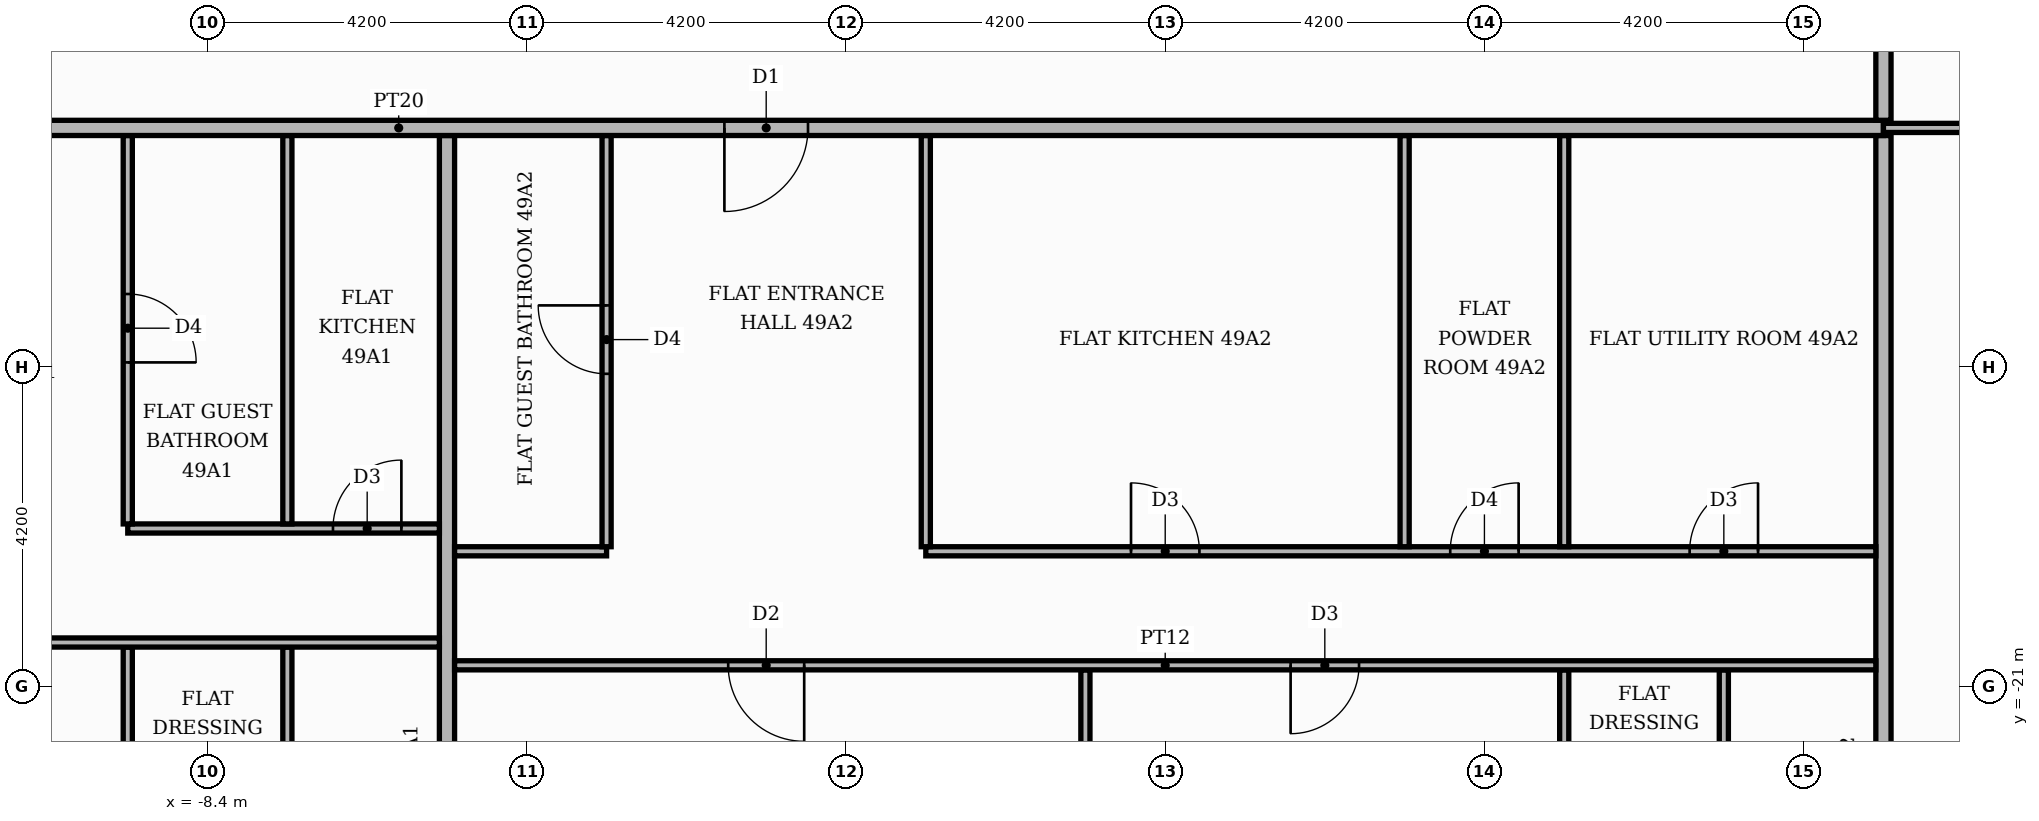
"""IFC4 building model, lengths in metres.
Left out: names, types, materials, properties, quantities, classifications, styles, units other than length and angle.
Written with IfcOpenShell. Run it as: python <this file> out.ifc"""

import sys

from ifc_helpers import new_model, si_unit, direction, frame, frame_2d, origin, place, context, subcontext, project, spatial, rectangle, extrude, element, fill, save


model = new_model("IFC4")
c1 = context("Model", 3, precision=1e-05, world=origin(), true_north=direction((0.0, 1.0)))
c2 = subcontext(c1, "Body", "Model", "MODEL_VIEW")
j1 = project(units=[si_unit("LENGTHUNIT", "METRE"), si_unit("PLANEANGLEUNIT", "RADIAN")], contexts=[c1])
p1 = place(None, origin())
s1 = spatial("IfcSite", under=j1, at=p1, CompositionType="ELEMENT")
p2 = place(p1, origin())
s2 = spatial("IfcBuilding", under=s1, at=p2, CompositionType="ELEMENT")
p3 = place(p2, frame((0.0, 0.0, 207.9)))
s3 = spatial("IfcBuildingStorey", under=s2, at=p3, CompositionType="ELEMENT", Elevation=207.9)
p4 = place(p3, frame((-9.45, -25.42, 0.0), z_axis=(0.0, 0.0, 1.0), x_axis=(0.0, 1.0, 0.0)))
e1 = element("IfcWall", 1, at=p4, inside=s3, PredefinedType="PARTITIONING", context=c2, shape_type="SweptSolid", body=[
    extrude(rectangle(XDim=4.94, YDim=0.12, at=frame_2d((2.47, 0.0))), origin(), (0.0, 0.0, 1.0), 3.48),
])
p5 = place(p4, frame((1.9, 0.0, 0.0)))
e2 = element("IfcOpeningElement", 2, at=p5, cuts=e1, PredefinedType="OPENING", context=c2, shape_type="SweptSolid", body=[
    extrude(rectangle(XDim=0.9, YDim=2.1, at=frame_2d((0.45, 1.05))), frame((0.0, 0.07, 0.0), z_axis=(0.0, -1.0, 0.0), x_axis=(1.0, 0.0, 0.0)), (0.0, 0.0, 1.0), 0.14),
])
p6 = place(p3, frame((-7.35, -25.42, 0.0), z_axis=(0.0, 0.0, 1.0), x_axis=(0.0, 1.0, 0.0)))
e3 = element("IfcWall", 3, at=p6, inside=s3, PredefinedType="PARTITIONING", context=c2, shape_type="SweptSolid", body=[
    extrude(rectangle(XDim=4.94, YDim=0.12, at=frame_2d((2.47, 0.0))), origin(), (0.0, 0.0, 1.0), 3.48),
])
p7 = place(p6, frame((1.9, 0.0, 0.0)))
e4 = element("IfcOpeningElement", 4, at=p7, cuts=e3, PredefinedType="OPENING", context=c2, shape_type="SweptSolid", body=[
    extrude(rectangle(XDim=0.9, YDim=2.1, at=frame_2d((0.45, 1.05))), frame((0.0, 0.07, 0.0), z_axis=(0.0, -1.0, 0.0), x_axis=(1.0, 0.0, 0.0)), (0.0, 0.0, 1.0), 0.14),
])
p8 = place(p3, frame((-5.25, -25.42, 0.0), z_axis=(0.0, 0.0, 1.0), x_axis=(0.0, 1.0, 0.0)))
e5 = element("IfcWall", 5, at=p8, inside=s3, PredefinedType="PARTITIONING", context=c2, shape_type="SweptSolid", body=[
    extrude(rectangle(XDim=11.67, YDim=0.2, at=frame_2d((5.835, 0.0))), origin(), (0.0, 0.0, 1.0), 3.48),
])
p9 = place(p3, frame((3.15, -25.42, 0.0), z_axis=(0.0, 0.0, 1.0), x_axis=(0.0, 1.0, 0.0)))
e6 = element("IfcWall", 6, at=p9, inside=s3, PredefinedType="PARTITIONING", context=c2, shape_type="SweptSolid", body=[
    extrude(rectangle(XDim=4.64, YDim=0.12, at=frame_2d((2.32, 0.0))), origin(), (0.0, 0.0, 1.0), 3.48),
])
p10 = place(p3, frame((9.45, -25.42, 0.0), z_axis=(0.0, 0.0, 1.0), x_axis=(0.0, 1.0, 0.0)))
e7 = element("IfcWall", 7, at=p10, inside=s3, PredefinedType="PARTITIONING", context=c2, shape_type="SweptSolid", body=[
    extrude(rectangle(XDim=4.64, YDim=0.12, at=frame_2d((2.32, 0.0))), origin(), (0.0, 0.0, 1.0), 3.48),
])
p11 = place(p10, frame((1.75, 0.0, 0.0)))
e8 = element("IfcOpeningElement", 8, at=p11, cuts=e7, PredefinedType="OPENING", context=c2, shape_type="SweptSolid", body=[
    extrude(rectangle(XDim=0.9, YDim=2.1, at=frame_2d((0.45, 1.05))), frame((0.0, 0.07, 0.0), z_axis=(0.0, -1.0, 0.0), x_axis=(1.0, 0.0, 0.0)), (0.0, 0.0, 1.0), 0.14),
])
p12 = place(p3, frame((11.55, -25.42, 0.0), z_axis=(0.0, 0.0, 1.0), x_axis=(0.0, 1.0, 0.0)))
e9 = element("IfcWall", 9, at=p12, inside=s3, PredefinedType="PARTITIONING", context=c2, shape_type="SweptSolid", body=[
    extrude(rectangle(XDim=4.64, YDim=0.12, at=frame_2d((2.32, 0.0))), origin(), (0.0, 0.0, 1.0), 3.48),
])
p13 = place(p12, frame((1.75, 0.0, 0.0)))
e10 = element("IfcOpeningElement", 10, at=p13, cuts=e9, PredefinedType="OPENING", context=c2, shape_type="SweptSolid", body=[
    extrude(rectangle(XDim=0.9, YDim=2.1, at=frame_2d((0.45, 1.05))), frame((0.0, 0.07, 0.0), z_axis=(0.0, -1.0, 0.0), x_axis=(1.0, 0.0, 0.0)), (0.0, 0.0, 1.0), 0.14),
])
p14 = place(p3, frame((13.65, -25.42, 0.0), z_axis=(0.0, 0.0, 1.0), x_axis=(0.0, 1.0, 0.0)))
e11 = element("IfcWall", 11, at=p14, inside=s3, PredefinedType="PARTITIONING", context=c2, shape_type="SweptSolid", body=[
    extrude(rectangle(XDim=11.67, YDim=0.2, at=frame_2d((5.835, 0.0))), origin(), (0.0, 0.0, 1.0), 3.48),
])
p15 = place(p3, frame((-5.15, -20.72, 0.0), z_axis=(0.0, 0.0, 1.0), x_axis=(1.0, 0.0, 0.0)))
e12 = element("IfcWall", 12, at=p15, inside=s3, PredefinedType="PARTITIONING", context=c2, shape_type="SweptSolid", body=[
    extrude(rectangle(XDim=18.7, YDim=0.12, at=frame_2d((9.35, 0.0))), origin(), (0.0, 0.0, 1.0), 3.48),
])
p16 = place(p15, frame((3.6, 0.0, 0.0)))
e13 = element("IfcOpeningElement", 13, at=p16, cuts=e12, PredefinedType="OPENING", context=c2, shape_type="SweptSolid", body=[
    extrude(rectangle(XDim=1.0, YDim=2.1, at=frame_2d((0.5, 1.05))), frame((0.0, 0.07, 0.0), z_axis=(0.0, -1.0, 0.0), x_axis=(1.0, 0.0, 0.0)), (0.0, 0.0, 1.0), 0.14),
])
p17 = place(p15, frame((11.0, 0.0, 0.0)))
e14 = element("IfcOpeningElement", 14, at=p17, cuts=e12, PredefinedType="OPENING", context=c2, shape_type="SweptSolid", body=[
    extrude(rectangle(XDim=0.9, YDim=2.1, at=frame_2d((0.45, 1.05))), frame((0.0, 0.07, 0.0), z_axis=(0.0, -1.0, 0.0), x_axis=(1.0, 0.0, 0.0)), (0.0, 0.0, 1.0), 0.14),
])
p18 = place(p3, frame((-21.219, -20.42, 0.0), z_axis=(0.0, 0.0, 1.0), x_axis=(1.0, 0.0, 0.0)))
e15 = element("IfcWall", 15, at=p18, inside=s3, PredefinedType="PARTITIONING", context=c2, shape_type="SweptSolid", body=[
    extrude(rectangle(XDim=15.869, YDim=0.12, at=frame_2d((7.935, 0.0))), origin(), (0.0, 0.0, 1.0), 3.48),
])
p19 = place(p18, frame((6.019, 0.0, 0.0)))
e16 = element("IfcOpeningElement", 16, at=p19, cuts=e15, PredefinedType="OPENING", context=c2, shape_type="SweptSolid", body=[
    extrude(rectangle(XDim=1.0, YDim=2.1, at=frame_2d((0.5, 1.05))), frame((0.0, 0.07, 0.0), z_axis=(0.0, -1.0, 0.0), x_axis=(1.0, 0.0, 0.0)), (0.0, 0.0, 1.0), 0.14),
])
p20 = place(p18, frame((9.219, 0.0, 0.0)))
e17 = element("IfcOpeningElement", 17, at=p20, cuts=e15, PredefinedType="OPENING", context=c2, shape_type="SweptSolid", body=[
    extrude(rectangle(XDim=0.9, YDim=2.1, at=frame_2d((0.45, 1.05))), frame((0.0, 0.07, 0.0), z_axis=(0.0, -1.0, 0.0), x_axis=(1.0, 0.0, 0.0)), (0.0, 0.0, 1.0), 0.14),
])
p21 = place(p3, frame((-5.15, -19.22, 0.0), z_axis=(0.0, 0.0, 1.0), x_axis=(1.0, 0.0, 0.0)))
e18 = element("IfcWall", 18, at=p21, inside=s3, PredefinedType="PARTITIONING", context=c2, shape_type="SweptSolid", body=[
    extrude(rectangle(XDim=2.0, YDim=0.12, at=frame_2d((1.0, 0.0))), origin(), (0.0, 0.0, 1.0), 3.48),
])
p22 = place(p3, frame((1.05, -19.22, 0.0), z_axis=(0.0, 0.0, 1.0), x_axis=(1.0, 0.0, 0.0)))
e19 = element("IfcWall", 19, at=p22, inside=s3, PredefinedType="PARTITIONING", context=c2, shape_type="SweptSolid", body=[
    extrude(rectangle(XDim=12.5, YDim=0.12, at=frame_2d((6.25, 0.0))), origin(), (0.0, 0.0, 1.0), 3.48),
])
p23 = place(p22, frame((2.7, 0.0, 0.0)))
e20 = element("IfcOpeningElement", 20, at=p23, cuts=e19, PredefinedType="OPENING", context=c2, shape_type="SweptSolid", body=[
    extrude(rectangle(XDim=0.9, YDim=2.1, at=frame_2d((0.45, 1.05))), frame((0.0, 0.07, 0.0), z_axis=(0.0, -1.0, 0.0), x_axis=(1.0, 0.0, 0.0)), (0.0, 0.0, 1.0), 0.14),
])
p24 = place(p22, frame((6.9, 0.0, 0.0)))
e21 = element("IfcOpeningElement", 21, at=p24, cuts=e19, PredefinedType="OPENING", context=c2, shape_type="SweptSolid", body=[
    extrude(rectangle(XDim=0.9, YDim=2.1, at=frame_2d((0.45, 1.05))), frame((0.0, 0.07, 0.0), z_axis=(0.0, -1.0, 0.0), x_axis=(1.0, 0.0, 0.0)), (0.0, 0.0, 1.0), 0.14),
])
p25 = place(p22, frame((10.05, 0.0, 0.0)))
e22 = element("IfcOpeningElement", 22, at=p25, cuts=e19, PredefinedType="OPENING", context=c2, shape_type="SweptSolid", body=[
    extrude(rectangle(XDim=0.9, YDim=2.1, at=frame_2d((0.45, 1.05))), frame((0.0, 0.07, 0.0), z_axis=(0.0, -1.0, 0.0), x_axis=(1.0, 0.0, 0.0)), (0.0, 0.0, 1.0), 0.14),
])
p26 = place(p3, frame((-3.15, -19.16, 0.0), z_axis=(0.0, 0.0, 1.0), x_axis=(0.0, 1.0, 0.0)))
e23 = element("IfcWall", 23, at=p26, inside=s3, PredefinedType="PARTITIONING", context=c2, shape_type="SweptSolid", body=[
    extrude(rectangle(XDim=5.41, YDim=0.12, at=frame_2d((2.705, 0.0))), origin(), (0.0, 0.0, 1.0), 3.48),
])
p27 = place(p26, frame((2.275, 0.0, 0.0)))
e24 = element("IfcOpeningElement", 24, at=p27, cuts=e23, PredefinedType="OPENING", context=c2, shape_type="SweptSolid", body=[
    extrude(rectangle(XDim=0.9, YDim=2.1, at=frame_2d((0.45, 1.05))), frame((0.0, 0.07, 0.0), z_axis=(0.0, -1.0, 0.0), x_axis=(1.0, 0.0, 0.0)), (0.0, 0.0, 1.0), 0.14),
])
for number, where, z_axis, x_axis in (
    (25, (1.05, -19.16, 0.0), (0.0, 0.0, 1.0), (0.0, 1.0, 0.0)),
    (26, (7.35, -19.16, 0.0), (0.0, 0.0, 1.0), (0.0, 1.0, 0.0)),
    (27, (9.45, -19.16, 0.0), (0.0, 0.0, 1.0), (0.0, 1.0, 0.0)),
):
    element("IfcWall", number, at=place(p3, frame(where, z_axis=z_axis, x_axis=x_axis)), inside=s3, PredefinedType="PARTITIONING", context=c2, shape_type="SweptSolid", body=[
        extrude(rectangle(XDim=5.41, YDim=0.12, at=frame_2d((2.705, 0.0))), origin(), (0.0, 0.0, 1.0), 3.48),
    ])
p28 = place(p3, frame((-9.45, -18.92, 0.0), z_axis=(0.0, 0.0, 1.0), x_axis=(1.0, 0.0, 0.0)))
e28 = element("IfcWall", 28, at=p28, inside=s3, PredefinedType="PARTITIONING", context=c2, shape_type="SweptSolid", body=[
    extrude(rectangle(XDim=4.1, YDim=0.12, at=frame_2d((2.05, 0.0))), origin(), (0.0, 0.0, 1.0), 3.48),
])
p29 = place(p28, frame((2.7, 0.0, 0.0)))
e29 = element("IfcOpeningElement", 29, at=p29, cuts=e28, PredefinedType="OPENING", context=c2, shape_type="SweptSolid", body=[
    extrude(rectangle(XDim=0.9, YDim=2.1, at=frame_2d((0.45, 1.05))), frame((0.0, 0.07, 0.0), z_axis=(0.0, -1.0, 0.0), x_axis=(1.0, 0.0, 0.0)), (0.0, 0.0, 1.0), 0.14),
])
p30 = place(p3, frame((-9.45, -18.86, 0.0), z_axis=(0.0, 0.0, 1.0), x_axis=(0.0, 1.0, 0.0)))
e30 = element("IfcWall", 30, at=p30, inside=s3, PredefinedType="PARTITIONING", context=c2, shape_type="SweptSolid", body=[
    extrude(rectangle(XDim=5.11, YDim=0.12, at=frame_2d((2.555, 0.0))), origin(), (0.0, 0.0, 1.0), 3.48),
])
p31 = place(p30, frame((2.125, 0.0, 0.0)))
e31 = element("IfcOpeningElement", 31, at=p31, cuts=e30, PredefinedType="OPENING", context=c2, shape_type="SweptSolid", body=[
    extrude(rectangle(XDim=0.9, YDim=2.1, at=frame_2d((0.45, 1.05))), frame((0.0, 0.07, 0.0), z_axis=(0.0, -1.0, 0.0), x_axis=(1.0, 0.0, 0.0)), (0.0, 0.0, 1.0), 0.14),
])
p32 = place(p3, frame((-7.35, -18.86, 0.0), z_axis=(0.0, 0.0, 1.0), x_axis=(0.0, 1.0, 0.0)))
e32 = element("IfcWall", 32, at=p32, inside=s3, PredefinedType="PARTITIONING", context=c2, shape_type="SweptSolid", body=[
    extrude(rectangle(XDim=5.11, YDim=0.12, at=frame_2d((2.555, 0.0))), origin(), (0.0, 0.0, 1.0), 3.48),
])
p33 = place(p3, frame((-25.42, -13.65, 0.0), z_axis=(0.0, 0.0, 1.0), x_axis=(1.0, 0.0, 0.0)))
e33 = element("IfcWall", 33, at=p33, inside=s3, PredefinedType="PARTITIONING", context=c2, shape_type="SweptSolid", body=[
    extrude(rectangle(XDim=39.07, YDim=0.2, at=frame_2d((19.535, 0.0))), origin(), (0.0, 0.0, 1.0), 3.48),
])
p34 = place(p33, frame((13.32, 0.0, 0.0)))
e34 = element("IfcOpeningElement", 34, at=p34, cuts=e33, PredefinedType="OPENING", context=c2, shape_type="SweptSolid", body=[
    extrude(rectangle(XDim=1.1, YDim=2.4, at=frame_2d((0.55, 1.2))), frame((0.0, 0.11, 0.0), z_axis=(0.0, -1.0, 0.0), x_axis=(1.0, 0.0, 0.0)), (0.0, 0.0, 1.0), 0.22),
])
p35 = place(p33, frame((23.82, 0.0, 0.0)))
e35 = element("IfcOpeningElement", 35, at=p35, cuts=e33, PredefinedType="OPENING", context=c2, shape_type="SweptSolid", body=[
    extrude(rectangle(XDim=1.1, YDim=2.4, at=frame_2d((0.55, 1.2))), frame((0.0, 0.11, 0.0), z_axis=(0.0, -1.0, 0.0), x_axis=(1.0, 0.0, 0.0)), (0.0, 0.0, 1.0), 0.22),
])
p36 = place(p3, frame((13.65, -13.65, 0.0), z_axis=(0.0, 0.0, 1.0), x_axis=(1.0, 0.0, 0.0)))
e36 = element("IfcWall", 36, at=p36, inside=s3, PredefinedType="PARTITIONING", context=c2, shape_type="SweptSolid", body=[
    extrude(rectangle(XDim=6.17, YDim=0.12, at=frame_2d((3.085, 0.0))), origin(), (0.0, 0.0, 1.0), 3.48),
])
p37 = place(p36, frame((2.635, 0.0, 0.0)))
e37 = element("IfcOpeningElement", 37, at=p37, cuts=e36, PredefinedType="OPENING", context=c2, shape_type="SweptSolid", body=[
    extrude(rectangle(XDim=0.9, YDim=2.1, at=frame_2d((0.45, 1.05))), frame((0.0, 0.07, 0.0), z_axis=(0.0, -1.0, 0.0), x_axis=(1.0, 0.0, 0.0)), (0.0, 0.0, 1.0), 0.14),
])
p38 = place(p3, frame((13.65, -13.55, 0.0), z_axis=(0.0, 0.0, 1.0), x_axis=(0.0, 1.0, 0.0)))
e38 = element("IfcWall", 38, at=p38, inside=s3, PredefinedType="PARTITIONING", context=c2, shape_type="SweptSolid", body=[
    extrude(rectangle(XDim=2.45, YDim=0.2, at=frame_2d((1.225, 0.0))), origin(), (0.0, 0.0, 1.0), 3.48),
])
p39 = place(p31, frame((0.9, 0.0, 0.0), z_axis=(0.0, 0.0, 1.0), x_axis=(-1.0, 0.0, 0.0)))
e39 = element("IfcDoor", 39, at=p39, inside=s3, OperationType="SINGLE_SWING_LEFT", PredefinedType="DOOR", context=c2, shape_type="SweptSolid", body=[
    extrude(rectangle(XDim=0.9, YDim=2.1, at=frame_2d((0.45, 1.05))), frame((0.0, 0.025, 0.0), z_axis=(0.0, -1.0, 0.0), x_axis=(1.0, 0.0, 0.0)), (0.0, 0.0, 1.0), 0.05),
])
fill(e31, e39)
p40 = place(p29, origin())
e40 = element("IfcDoor", 40, at=p40, inside=s3, OperationType="SINGLE_SWING_RIGHT", PredefinedType="DOOR", context=c2, shape_type="SweptSolid", body=[
    extrude(rectangle(XDim=0.9, YDim=2.1, at=frame_2d((0.45, 1.05))), frame((0.0, 0.025, 0.0), z_axis=(0.0, -1.0, 0.0), x_axis=(1.0, 0.0, 0.0)), (0.0, 0.0, 1.0), 0.05),
])
fill(e29, e40)
p41 = place(p35, frame((1.1, 0.0, 0.0), z_axis=(0.0, 0.0, 1.0), x_axis=(-1.0, 0.0, 0.0)))
e41 = element("IfcDoor", 41, at=p41, inside=s3, OperationType="SINGLE_SWING_LEFT", PredefinedType="DOOR", context=c2, shape_type="SweptSolid", body=[
    extrude(rectangle(XDim=1.1, YDim=2.4, at=frame_2d((0.55, 1.2))), frame((0.0, 0.025, 0.0), z_axis=(0.0, -1.0, 0.0), x_axis=(1.0, 0.0, 0.0)), (0.0, 0.0, 1.0), 0.05),
])
fill(e35, e41)
p42 = place(p27, origin())
e42 = element("IfcDoor", 42, at=p42, inside=s3, OperationType="SINGLE_SWING_RIGHT", PredefinedType="DOOR", context=c2, shape_type="SweptSolid", body=[
    extrude(rectangle(XDim=0.9, YDim=2.1, at=frame_2d((0.45, 1.05))), frame((0.0, 0.025, 0.0), z_axis=(0.0, -1.0, 0.0), x_axis=(1.0, 0.0, 0.0)), (0.0, 0.0, 1.0), 0.05),
])
fill(e24, e42)
p43 = place(p23, origin())
e43 = element("IfcDoor", 43, at=p43, inside=s3, OperationType="SINGLE_SWING_LEFT", PredefinedType="DOOR", context=c2, shape_type="SweptSolid", body=[
    extrude(rectangle(XDim=0.9, YDim=2.1, at=frame_2d((0.45, 1.05))), frame((0.0, 0.025, 0.0), z_axis=(0.0, -1.0, 0.0), x_axis=(1.0, 0.0, 0.0)), (0.0, 0.0, 1.0), 0.05),
])
fill(e20, e43)
p44 = place(p24, origin())
e44 = element("IfcDoor", 44, at=p44, inside=s3, OperationType="SINGLE_SWING_RIGHT", PredefinedType="DOOR", context=c2, shape_type="SweptSolid", body=[
    extrude(rectangle(XDim=0.9, YDim=2.1, at=frame_2d((0.45, 1.05))), frame((0.0, 0.025, 0.0), z_axis=(0.0, -1.0, 0.0), x_axis=(1.0, 0.0, 0.0)), (0.0, 0.0, 1.0), 0.05),
])
fill(e21, e44)
p45 = place(p25, origin())
e45 = element("IfcDoor", 45, at=p45, inside=s3, OperationType="SINGLE_SWING_RIGHT", PredefinedType="DOOR", context=c2, shape_type="SweptSolid", body=[
    extrude(rectangle(XDim=0.9, YDim=2.1, at=frame_2d((0.45, 1.05))), frame((0.0, 0.025, 0.0), z_axis=(0.0, -1.0, 0.0), x_axis=(1.0, 0.0, 0.0)), (0.0, 0.0, 1.0), 0.05),
])
fill(e22, e45)
p46 = place(p16, frame((1.0, 0.0, 0.0), z_axis=(0.0, 0.0, 1.0), x_axis=(-1.0, 0.0, 0.0)))
e46 = element("IfcDoor", 46, at=p46, inside=s3, OperationType="SINGLE_SWING_RIGHT", PredefinedType="DOOR", context=c2, shape_type="SweptSolid", body=[
    extrude(rectangle(XDim=1.0, YDim=2.1, at=frame_2d((0.5, 1.05))), frame((0.0, 0.025, 0.0), z_axis=(0.0, -1.0, 0.0), x_axis=(1.0, 0.0, 0.0)), (0.0, 0.0, 1.0), 0.05),
])
fill(e13, e46)
p47 = place(p17, frame((0.9, 0.0, 0.0), z_axis=(0.0, 0.0, 1.0), x_axis=(-1.0, 0.0, 0.0)))
e47 = element("IfcDoor", 47, at=p47, inside=s3, OperationType="SINGLE_SWING_LEFT", PredefinedType="DOOR", context=c2, shape_type="SweptSolid", body=[
    extrude(rectangle(XDim=0.9, YDim=2.1, at=frame_2d((0.45, 1.05))), frame((0.0, 0.025, 0.0), z_axis=(0.0, -1.0, 0.0), x_axis=(1.0, 0.0, 0.0)), (0.0, 0.0, 1.0), 0.05),
])
fill(e14, e47)
save(model, sys.argv[1])
